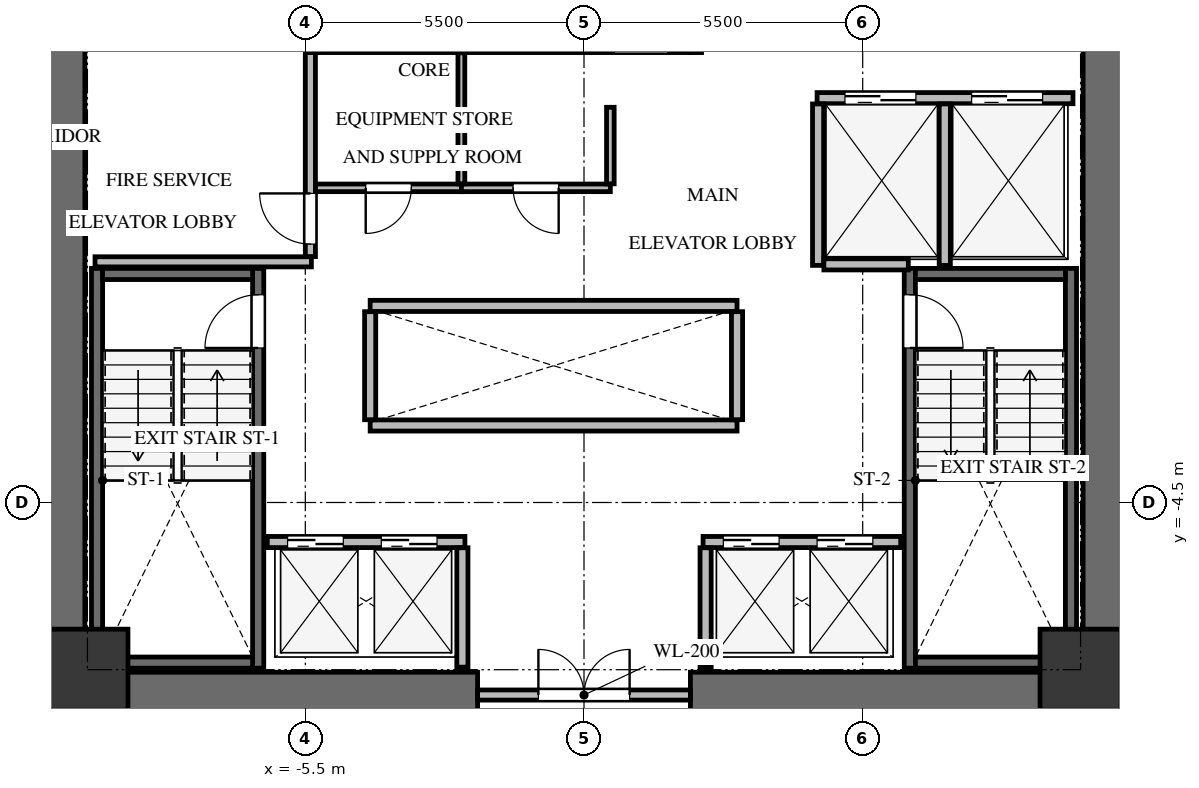
"""IFC4 building model, lengths in metres.
Left out: names, types, materials, properties, quantities, classifications, styles, units other than length and angle.
Written with IfcOpenShell. Run it as: python <this file> out.ifc"""

import sys

from ifc_helpers import new_model, si_unit, direction, frame, frame_2d, origin, origin_2d, place, context, subcontext, project, spatial, rectangle, extrude, source, transform, mapped, element, fill, save


model = new_model("IFC4")
c1 = context("Model", 3, precision=1e-05, world=origin(), true_north=direction((0.0, 1.0)))
c2 = subcontext(c1, "Body", "Model", "MODEL_VIEW")
j1 = project(units=[si_unit("LENGTHUNIT", "METRE"), si_unit("PLANEANGLEUNIT", "RADIAN")], contexts=[c1])
p1 = place(None, origin())
s1 = spatial("IfcSite", under=j1, at=p1, CompositionType="ELEMENT")
p2 = place(p1, origin())
s2 = spatial("IfcBuilding", under=s1, at=p2, CompositionType="ELEMENT")
p3 = place(p2, frame((0.0, 0.0, 48.9)))
s3 = spatial("IfcBuildingStorey", under=s2, at=p3, CompositionType="ELEMENT", Elevation=48.9)
for number, where, z_axis, x_axis in (
    (1, (-10.3, -8.75, 0.0), (0.0, 0.0, 1.0), (0.0, 1.0, 0.0)),
    (2, (10.3, -8.75, 0.0), (0.0, 0.0, 1.0), (0.0, 1.0, 0.0)),
):
    element("IfcWall", number, at=place(p3, frame(where, z_axis=z_axis, x_axis=x_axis)), inside=s3, PredefinedType="SHEAR", context=c2, shape_type="SweptSolid", body=[
        extrude(rectangle(XDim=17.5, YDim=0.9, at=frame_2d((8.75, 0.0))), origin(), (0.0, 0.0, 1.0), 3.3),
    ])
for number, where, z_axis, x_axis in (
    (3, (-9.85, -8.3, 0.0), (0.0, 0.0, 1.0), (1.0, 0.0, 0.0)),
    (4, (2.1, -8.3, 0.0), (0.0, 0.0, 1.0), (1.0, 0.0, 0.0)),
):
    element("IfcWall", number, at=place(p3, frame(where, z_axis=z_axis, x_axis=x_axis)), inside=s3, PredefinedType="SHEAR", context=c2, shape_type="SweptSolid", body=[
        extrude(rectangle(XDim=7.75, YDim=0.9, at=frame_2d((3.875, 0.0))), origin(), (0.0, 0.0, 1.0), 3.3),
    ])
p4 = place(p3, frame((-6.43, -7.77, -0.24), z_axis=(0.0, 0.0, 1.0), x_axis=(0.0, 1.0, 0.0)))
e5 = element("IfcWall", 5, at=p4, inside=s3, PredefinedType="SHEAR", context=c2, shape_type="SweptSolid", body=[
    extrude(rectangle(XDim=7.89, YDim=0.22, at=frame_2d((3.945, 0.0))), origin(), (0.0, 0.0, 1.0), 3.3),
])
p5 = place(p4, frame((6.32, 0.0, 0.0)))
e6 = element("IfcOpeningElement", 6, at=p5, cuts=e5, PredefinedType="OPENING", context=c2, shape_type="SweptSolid", body=[
    extrude(rectangle(XDim=1.05, YDim=2.15, at=frame_2d((0.525, 1.075))), frame((0.0, 0.12, 0.0), z_axis=(0.0, -1.0, 0.0), x_axis=(1.0, 0.0, 0.0)), (0.0, 0.0, 1.0), 0.24),
])
p6 = place(p3, frame((-9.61, 0.12, -0.24), z_axis=(0.0, 0.0, 1.0), x_axis=(0.0, -1.0, 0.0)))
e7 = element("IfcWall", 7, at=p6, inside=s3, PredefinedType="SHEAR", context=c2, shape_type="SweptSolid", body=[
    extrude(rectangle(XDim=7.89, YDim=0.22, at=frame_2d((3.945, 0.0))), origin(), (0.0, 0.0, 1.0), 3.3),
])
for number, where, z_axis, x_axis in (
    (8, (-9.5, -7.66, -0.24), (0.0, 0.0, 1.0), (1.0, 0.0, 0.0)),
    (9, (-6.54, 0.01, -0.24), (0.0, 0.0, 1.0), (-1.0, 0.0, 0.0)),
):
    element("IfcWall", number, at=place(p3, frame(where, z_axis=z_axis, x_axis=x_axis)), inside=s3, PredefinedType="SHEAR", context=c2, shape_type="SweptSolid", body=[
        extrude(rectangle(XDim=2.96, YDim=0.22, at=frame_2d((1.48, 0.0))), origin(), (0.0, 0.0, 1.0), 3.3),
    ])
p7 = place(p3, frame((9.61, -7.77, -0.24), z_axis=(0.0, 0.0, 1.0), x_axis=(0.0, 1.0, 0.0)))
e10 = element("IfcWall", 10, at=p7, inside=s3, PredefinedType="SHEAR", context=c2, shape_type="SweptSolid", body=[
    extrude(rectangle(XDim=7.89, YDim=0.22, at=frame_2d((3.945, 0.0))), origin(), (0.0, 0.0, 1.0), 3.3),
])
p8 = place(p3, frame((6.43, 0.12, -0.24), z_axis=(0.0, 0.0, 1.0), x_axis=(0.0, -1.0, 0.0)))
e11 = element("IfcWall", 11, at=p8, inside=s3, PredefinedType="SHEAR", context=c2, shape_type="SweptSolid", body=[
    extrude(rectangle(XDim=7.89, YDim=0.22, at=frame_2d((3.945, 0.0))), origin(), (0.0, 0.0, 1.0), 3.3),
])
p9 = place(p8, frame((0.52, 0.0, 0.0)))
e12 = element("IfcOpeningElement", 12, at=p9, cuts=e11, PredefinedType="OPENING", context=c2, shape_type="SweptSolid", body=[
    extrude(rectangle(XDim=1.05, YDim=2.15, at=frame_2d((0.525, 1.075))), frame((0.0, 0.12, 0.0), z_axis=(0.0, -1.0, 0.0), x_axis=(1.0, 0.0, 0.0)), (0.0, 0.0, 1.0), 0.24),
])
for number, where, z_axis, x_axis in (
    (13, (6.54, -7.66, -0.24), (0.0, 0.0, 1.0), (1.0, 0.0, 0.0)),
    (14, (9.5, 0.01, -0.24), (0.0, 0.0, 1.0), (-1.0, 0.0, 0.0)),
):
    element("IfcWall", number, at=place(p3, frame(where, z_axis=z_axis, x_axis=x_axis)), inside=s3, PredefinedType="SHEAR", context=c2, shape_type="SweptSolid", body=[
        extrude(rectangle(XDim=2.96, YDim=0.22, at=frame_2d((1.48, 0.0))), origin(), (0.0, 0.0, 1.0), 3.3),
    ])
for number, where, z_axis, x_axis in (
    (15, (2.21, 4.38, -0.24), (0.0, 0.0, 1.0), (0.0, 1.0, 0.0)),
    (16, (-5.36, 7.78, -0.24), (0.0, 0.0, 1.0), (0.0, -1.0, 0.0)),
):
    element("IfcWall", number, at=place(p3, frame(where, z_axis=z_axis, x_axis=x_axis)), inside=s3, PredefinedType="SHEAR", context=c2, shape_type="SweptSolid", body=[
        extrude(rectangle(XDim=3.4, YDim=0.22, at=frame_2d((1.7, 0.0))), origin(), (0.0, 0.0, 1.0), 3.3),
    ])
p10 = place(p3, frame((-5.25, 4.49, -0.24), z_axis=(0.0, 0.0, 1.0), x_axis=(1.0, 0.0, 0.0)))
e17 = element("IfcWall", 17, at=p10, inside=s3, PredefinedType="SHEAR", context=c2, shape_type="SweptSolid", body=[
    extrude(rectangle(XDim=7.35, YDim=0.22, at=frame_2d((3.675, 0.0))), origin(), (0.0, 0.0, 1.0), 3.3),
])
p11 = place(p10, frame((5.85, 0.0, 0.0)))
e18 = element("IfcOpeningElement", 18, at=p11, cuts=e17, PredefinedType="OPENING", context=c2, shape_type="SweptSolid", body=[
    extrude(rectangle(XDim=1.05, YDim=2.15, at=frame_2d((0.525, 1.075))), frame((0.0, 0.12, 0.0), z_axis=(0.0, -1.0, 0.0), x_axis=(1.0, 0.0, 0.0)), (0.0, 0.0, 1.0), 0.24),
])
m1 = source(origin(), c2, "Body", "SweptSolid", [
    extrude(rectangle(XDim=1.6, YDim=1.6, at=origin_2d()), origin(), (0.0, 0.0, 1.0), 3.3),
])
for number, where, z_axis, x_axis in (
    (19, (-9.8, -7.8, -0.24), (0.0, 0.0, 1.0), (1.0, 0.0, 0.0)),
    (20, (9.8, -7.8, -0.24), (0.0, 0.0, 1.0), (1.0, 0.0, 0.0)),
):
    element("IfcColumn", number, at=place(p3, frame(where, z_axis=z_axis, x_axis=x_axis)), inside=s3, PredefinedType="COLUMN", context=c2, shape_type="MappedRepresentation", body=[
        mapped(m1, transform((0.0, 0.0, 0.0), x_axis=(1.0, 0.0, 0.0), y_axis=(0.0, 1.0, 0.0), z_axis=(0.0, 0.0, 1.0), scale=1.0)),
    ])
p12 = place(p3, frame((-2.1, -8.3, 0.0), z_axis=(0.0, 0.0, 1.0), x_axis=(1.0, 0.0, 0.0)))
e21 = element("IfcWall", 21, at=p12, inside=s3, PredefinedType="SOLIDWALL", context=c2, shape_type="SweptSolid", body=[
    extrude(rectangle(XDim=4.2, YDim=0.2, at=frame_2d((2.1, 0.0))), origin(), (0.0, 0.0, 1.0), 3.045),
])
p13 = place(p12, frame((1.2, 0.0, 0.0)))
e22 = element("IfcOpeningElement", 22, at=p13, cuts=e21, PredefinedType="OPENING", context=c2, shape_type="SweptSolid", body=[
    extrude(rectangle(XDim=1.8, YDim=2.15, at=frame_2d((0.9, 1.075))), frame((0.0, 0.11, 0.0), z_axis=(0.0, -1.0, 0.0), x_axis=(1.0, 0.0, 0.0)), (0.0, 0.0, 1.0), 0.22),
])
p14 = place(p3, frame((-9.65, 0.25, 0.0), z_axis=(0.0, 0.0, 1.0), x_axis=(1.0, 0.0, 0.0)))
e23 = element("IfcWall", 23, at=p14, inside=s3, PredefinedType="SOLIDWALL", context=c2, shape_type="SweptSolid", body=[
    extrude(rectangle(XDim=4.27, YDim=0.2, at=frame_2d((2.135, 0.0))), origin(), (0.0, 0.0, 1.0), 3.045),
])
p15 = place(p3, frame((-5.4, 0.354, 0.0), z_axis=(0.0, 0.0, 1.0), x_axis=(0.0, 1.0, 0.0)))
e24 = element("IfcWall", 24, at=p15, inside=s3, PredefinedType="SOLIDWALL", context=c2, shape_type="SweptSolid", body=[
    extrude(rectangle(XDim=4.026, YDim=0.2, at=frame_2d((2.013, 0.0))), origin(), (0.0, 0.0, 1.0), 3.045),
])
p16 = place(p15, frame((0.246, 0.0, 0.0)))
e25 = element("IfcOpeningElement", 25, at=p16, cuts=e24, PredefinedType="OPENING", context=c2, shape_type="SweptSolid", body=[
    extrude(rectangle(XDim=1.0, YDim=2.15, at=frame_2d((0.5, 1.075))), frame((0.0, 0.11, 0.0), z_axis=(0.0, -1.0, 0.0), x_axis=(1.0, 0.0, 0.0)), (0.0, 0.0, 1.0), 0.22),
])
p17 = place(p3, frame((4.6, 3.48, 0.0), z_axis=(0.0, 0.0, 1.0), x_axis=(1.0, 0.0, 0.0)))
e26 = element("IfcWall", 26, at=p17, inside=s3, PredefinedType="SOLIDWALL", context=c2, shape_type="SweptSolid", body=[
    extrude(rectangle(XDim=5.05, YDim=0.22, at=frame_2d((2.525, 0.0))), origin(), (0.0, 0.0, 1.0), 3.045),
])
p18 = place(p17, frame((0.55, 0.0, 0.0)))
e27 = element("IfcOpeningElement", 27, at=p18, cuts=e26, PredefinedType="OPENING", context=c2, shape_type="SweptSolid", body=[
    extrude(rectangle(XDim=1.4, YDim=2.15, at=frame_2d((0.7, 1.075))), frame((0.0, 0.12, 0.0), z_axis=(0.0, -1.0, 0.0), x_axis=(1.0, 0.0, 0.0)), (0.0, 0.0, 1.0), 0.24),
])
p19 = place(p17, frame((3.05, 0.0, 0.0)))
e28 = element("IfcOpeningElement", 28, at=p19, cuts=e26, PredefinedType="OPENING", context=c2, shape_type="SweptSolid", body=[
    extrude(rectangle(XDim=1.4, YDim=2.15, at=frame_2d((0.7, 1.075))), frame((0.0, 0.12, 0.0), z_axis=(0.0, -1.0, 0.0), x_axis=(1.0, 0.0, 0.0)), (0.0, 0.0, 1.0), 0.24),
])
for number, where, z_axis, x_axis in (
    (29, (4.62, 0.18, 0.0), (0.0, 0.0, 1.0), (0.0, 1.0, 0.0)),
    (30, (7.12, 0.18, 0.0), (0.0, 0.0, 1.0), (0.0, 1.0, 0.0)),
):
    element("IfcWall", number, at=place(p3, frame(where, z_axis=z_axis, x_axis=x_axis)), inside=s3, PredefinedType="SOLIDWALL", context=c2, shape_type="SweptSolid", body=[
        extrude(rectangle(XDim=3.186, YDim=0.22, at=frame_2d((1.593, 0.0))), origin(), (0.0, 0.0, 1.0), 3.045),
    ])
p20 = place(p3, frame((4.734, 0.2, 0.0), z_axis=(0.0, 0.0, 1.0), x_axis=(1.0, 0.0, 0.0)))
e31 = element("IfcWall", 31, at=p20, inside=s3, PredefinedType="SOLIDWALL", context=c2, shape_type="SweptSolid", body=[
    extrude(rectangle(XDim=1.666, YDim=0.22, at=frame_2d((0.833, 0.0))), origin(), (0.0, 0.0, 1.0), 3.045),
])
p21 = place(p3, frame((-6.25, -5.28, 0.0), z_axis=(0.0, 0.0, 1.0), x_axis=(1.0, 0.0, 0.0)))
e32 = element("IfcWall", 32, at=p21, inside=s3, PredefinedType="SOLIDWALL", context=c2, shape_type="SweptSolid", body=[
    extrude(rectangle(XDim=3.9, YDim=0.22, at=frame_2d((1.95, 0.0))), origin(), (0.0, 0.0, 1.0), 3.045),
])
p22 = place(p21, frame((0.4, 0.0, 0.0)))
e33 = element("IfcOpeningElement", 33, at=p22, cuts=e32, PredefinedType="OPENING", context=c2, shape_type="SweptSolid", body=[
    extrude(rectangle(XDim=1.1, YDim=2.15, at=frame_2d((0.55, 1.075))), frame((0.0, 0.12, 0.0), z_axis=(0.0, -1.0, 0.0), x_axis=(1.0, 0.0, 0.0)), (0.0, 0.0, 1.0), 0.24),
])
p23 = place(p21, frame((2.25, 0.0, 0.0)))
e34 = element("IfcOpeningElement", 34, at=p23, cuts=e32, PredefinedType="OPENING", context=c2, shape_type="SweptSolid", body=[
    extrude(rectangle(XDim=1.1, YDim=2.15, at=frame_2d((0.55, 1.075))), frame((0.0, 0.12, 0.0), z_axis=(0.0, -1.0, 0.0), x_axis=(1.0, 0.0, 0.0)), (0.0, 0.0, 1.0), 0.24),
])
p24 = place(p3, frame((2.35, -5.28, 0.0), z_axis=(0.0, 0.0, 1.0), x_axis=(1.0, 0.0, 0.0)))
e35 = element("IfcWall", 35, at=p24, inside=s3, PredefinedType="SOLIDWALL", context=c2, shape_type="SweptSolid", body=[
    extrude(rectangle(XDim=3.9, YDim=0.22, at=frame_2d((1.95, 0.0))), origin(), (0.0, 0.0, 1.0), 3.045),
])
p25 = place(p24, frame((0.4, 0.0, 0.0)))
e36 = element("IfcOpeningElement", 36, at=p25, cuts=e35, PredefinedType="OPENING", context=c2, shape_type="SweptSolid", body=[
    extrude(rectangle(XDim=1.1, YDim=2.15, at=frame_2d((0.55, 1.075))), frame((0.0, 0.12, 0.0), z_axis=(0.0, -1.0, 0.0), x_axis=(1.0, 0.0, 0.0)), (0.0, 0.0, 1.0), 0.24),
])
p26 = place(p24, frame((2.25, 0.0, 0.0)))
e37 = element("IfcOpeningElement", 37, at=p26, cuts=e35, PredefinedType="OPENING", context=c2, shape_type="SweptSolid", body=[
    extrude(rectangle(XDim=1.1, YDim=2.15, at=frame_2d((0.55, 1.075))), frame((0.0, 0.12, 0.0), z_axis=(0.0, -1.0, 0.0), x_axis=(1.0, 0.0, 0.0)), (0.0, 0.0, 1.0), 0.24),
])
for number, where, z_axis, x_axis in (
    (38, (-2.4, -7.75, 0.0), (0.0, 0.0, 1.0), (0.0, 1.0, 0.0)),
    (39, (2.4, -7.75, 0.0), (0.0, 0.0, 1.0), (0.0, 1.0, 0.0)),
):
    element("IfcWall", number, at=place(p3, frame(where, z_axis=z_axis, x_axis=x_axis)), inside=s3, PredefinedType="SOLIDWALL", context=c2, shape_type="SweptSolid", body=[
        extrude(rectangle(XDim=2.356, YDim=0.22, at=frame_2d((1.178, 0.0))), origin(), (0.0, 0.0, 1.0), 3.045),
    ])
for number, where, z_axis, x_axis in (
    (40, (-4.22, -2.98, 0.0), (0.0, 0.0, 1.0), (1.0, 0.0, 0.0)),
    (41, (-4.22, -0.62, 0.0), (0.0, 0.0, 1.0), (1.0, 0.0, 0.0)),
):
    element("IfcWall", number, at=place(p3, frame(where, z_axis=z_axis, x_axis=x_axis)), inside=s3, PredefinedType="SOLIDWALL", context=c2, shape_type="SweptSolid", body=[
        extrude(rectangle(XDim=7.24, YDim=0.22, at=frame_2d((3.62, 0.0))), origin(), (0.0, 0.0, 1.0), 3.045),
    ])
for number, where, z_axis, x_axis in (
    (42, (-4.22, -2.866, 0.0), (0.0, 0.0, 1.0), (0.0, 1.0, 0.0)),
    (43, (3.02, -2.866, 0.0), (0.0, 0.0, 1.0), (0.0, 1.0, 0.0)),
):
    element("IfcWall", number, at=place(p3, frame(where, z_axis=z_axis, x_axis=x_axis)), inside=s3, PredefinedType="SOLIDWALL", context=c2, shape_type="SweptSolid", body=[
        extrude(rectangle(XDim=2.132, YDim=0.22, at=frame_2d((1.066, 0.0))), origin(), (0.0, 0.0, 1.0), 3.045),
    ])
p27 = place(p3, frame((-2.42, 1.71, 0.0), z_axis=(0.0, 0.0, 1.0), x_axis=(-1.0, 0.0, 0.0)))
e44 = element("IfcWall", 44, at=p27, inside=s3, PredefinedType="PARTITIONING", context=c2, shape_type="SweptSolid", body=[
    extrude(rectangle(XDim=2.876, YDim=0.15, at=frame_2d((1.438, 0.0))), origin(), (0.0, 0.0, 1.0), 3.045),
])
p28 = place(p27, frame((0.988, 0.0, 0.0)))
e45 = element("IfcOpeningElement", 45, at=p28, cuts=e44, PredefinedType="OPENING", context=c2, shape_type="SweptSolid", body=[
    extrude(rectangle(XDim=0.9, YDim=2.05, at=frame_2d((0.45, 1.025))), frame((0.0, 0.085, 0.0), z_axis=(0.0, -1.0, 0.0), x_axis=(1.0, 0.0, 0.0)), (0.0, 0.0, 1.0), 0.17),
])
p29 = place(p3, frame((0.52, 1.71, 0.0), z_axis=(0.0, 0.0, 1.0), x_axis=(-1.0, 0.0, 0.0)))
e46 = element("IfcWall", 46, at=p29, inside=s3, PredefinedType="PARTITIONING", context=c2, shape_type="SweptSolid", body=[
    extrude(rectangle(XDim=2.94, YDim=0.15, at=frame_2d((1.47, 0.0))), origin(), (0.0, 0.0, 1.0), 3.045),
])
p30 = place(p29, frame((1.02, 0.0, 0.0)))
e47 = element("IfcOpeningElement", 47, at=p30, cuts=e46, PredefinedType="OPENING", context=c2, shape_type="SweptSolid", body=[
    extrude(rectangle(XDim=0.9, YDim=2.05, at=frame_2d((0.45, 1.025))), frame((0.0, 0.085, 0.0), z_axis=(0.0, -1.0, 0.0), x_axis=(1.0, 0.0, 0.0)), (0.0, 0.0, 1.0), 0.17),
])
p31 = place(p3, frame((0.52, 3.3, 0.0), z_axis=(0.0, 0.0, 1.0), x_axis=(0.0, -1.0, 0.0)))
e48 = element("IfcWall", 48, at=p31, inside=s3, PredefinedType="PARTITIONING", context=c2, shape_type="SweptSolid", body=[
    extrude(rectangle(XDim=1.511, YDim=0.15, at=frame_2d((0.755, 0.0))), origin(), (0.0, 0.0, 1.0), 3.045),
])
p32 = place(p3, frame((-2.42, 4.375, 0.0), z_axis=(0.0, 0.0, 1.0), x_axis=(0.0, -1.0, 0.0)))
e49 = element("IfcWall", 49, at=p32, inside=s3, PredefinedType="PARTITIONING", context=c2, shape_type="SweptSolid", body=[
    extrude(rectangle(XDim=2.586, YDim=0.135, at=frame_2d((1.293, 0.0))), origin(), (0.0, 0.0, 1.0), 3.045),
])
m2 = source(origin(), c2, "Body", "SweptSolid", [
    extrude(rectangle(XDim=1.05, YDim=2.15, at=frame_2d((0.525, 1.075))), frame((0.0, 0.025, 0.0), z_axis=(0.0, -1.0, 0.0), x_axis=(1.0, 0.0, 0.0)), (0.0, 0.0, 1.0), 0.05),
])
p33 = place(p5, origin())
e50 = element("IfcDoor", 50, at=p33, inside=s3, OperationType="SINGLE_SWING_LEFT", PredefinedType="DOOR", context=c2, shape_type="MappedRepresentation", body=[
    mapped(m2, transform((0.0, 0.0, 0.0), x_axis=(1.0, 0.0, 0.0), y_axis=(0.0, 1.0, 0.0), z_axis=(0.0, 0.0, 1.0), scale=1.0)),
])
fill(e6, e50)
m3 = source(origin(), c2, "Body", "SweptSolid", [
    extrude(rectangle(XDim=1.05, YDim=2.15, at=frame_2d((0.525, 1.075))), frame((0.0, 0.025, 0.0), z_axis=(0.0, -1.0, 0.0), x_axis=(1.0, 0.0, 0.0)), (0.0, 0.0, 1.0), 0.05),
])
p34 = place(p9, origin())
e51 = element("IfcDoor", 51, at=p34, inside=s3, OperationType="SINGLE_SWING_RIGHT", PredefinedType="DOOR", context=c2, shape_type="MappedRepresentation", body=[
    mapped(m3, transform((0.0, 0.0, 0.0), x_axis=(1.0, 0.0, 0.0), y_axis=(0.0, 1.0, 0.0), z_axis=(0.0, 0.0, 1.0), scale=1.0)),
])
fill(e12, e51)
m4 = source(origin(), c2, "Body", "SweptSolid", [
    extrude(rectangle(XDim=1.8, YDim=2.15, at=frame_2d((0.9, 1.075))), frame((0.0, 0.025, 0.0), z_axis=(0.0, -1.0, 0.0), x_axis=(1.0, 0.0, 0.0)), (0.0, 0.0, 1.0), 0.05),
])
p35 = place(p13, origin())
e52 = element("IfcDoor", 52, at=p35, inside=s3, OperationType="DOUBLE_DOOR_SINGLE_SWING", PredefinedType="DOOR", context=c2, shape_type="MappedRepresentation", body=[
    mapped(m4, transform((0.0, 0.0, 0.0), x_axis=(1.0, 0.0, 0.0), y_axis=(0.0, 1.0, 0.0), z_axis=(0.0, 0.0, 1.0), scale=1.0)),
])
fill(e22, e52)
m5 = source(origin(), c2, "Body", "SweptSolid", [
    extrude(rectangle(XDim=1.0, YDim=2.15, at=frame_2d((0.5, 1.075))), frame((0.0, 0.025, 0.0), z_axis=(0.0, -1.0, 0.0), x_axis=(1.0, 0.0, 0.0)), (0.0, 0.0, 1.0), 0.05),
])
p36 = place(p16, origin())
e53 = element("IfcDoor", 53, at=p36, inside=s3, OperationType="SINGLE_SWING_RIGHT", PredefinedType="DOOR", context=c2, shape_type="MappedRepresentation", body=[
    mapped(m5, transform((0.0, 0.0, 0.0), x_axis=(1.0, 0.0, 0.0), y_axis=(0.0, 1.0, 0.0), z_axis=(0.0, 0.0, 1.0), scale=1.0)),
])
fill(e25, e53)
m6 = source(origin(), c2, "Body", "SweptSolid", [
    extrude(rectangle(XDim=1.4, YDim=2.15, at=frame_2d((0.7, 1.075))), frame((0.0, 0.025, 0.0), z_axis=(0.0, -1.0, 0.0), x_axis=(1.0, 0.0, 0.0)), (0.0, 0.0, 1.0), 0.05),
])
p37 = place(p18, origin())
e54 = element("IfcDoor", 54, at=p37, inside=s3, OperationType="DOUBLE_DOOR_SLIDING", PredefinedType="DOOR", context=c2, shape_type="MappedRepresentation", body=[
    mapped(m6, transform((0.0, 0.0, 0.0), x_axis=(1.0, 0.0, 0.0), y_axis=(0.0, 1.0, 0.0), z_axis=(0.0, 0.0, 1.0), scale=1.0)),
])
fill(e27, e54)
p38 = place(p19, origin())
e55 = element("IfcDoor", 55, at=p38, inside=s3, OperationType="DOUBLE_DOOR_SLIDING", PredefinedType="DOOR", context=c2, shape_type="MappedRepresentation", body=[
    mapped(m6, transform((0.0, 0.0, 0.0), x_axis=(1.0, 0.0, 0.0), y_axis=(0.0, 1.0, 0.0), z_axis=(0.0, 0.0, 1.0), scale=1.0)),
])
fill(e28, e55)
m7 = source(origin(), c2, "Body", "SweptSolid", [
    extrude(rectangle(XDim=1.1, YDim=2.15, at=frame_2d((0.55, 1.075))), frame((0.0, 0.025, 0.0), z_axis=(0.0, -1.0, 0.0), x_axis=(1.0, 0.0, 0.0)), (0.0, 0.0, 1.0), 0.05),
])
p39 = place(p22, origin())
e56 = element("IfcDoor", 56, at=p39, inside=s3, OperationType="DOUBLE_DOOR_SLIDING", PredefinedType="DOOR", context=c2, shape_type="MappedRepresentation", body=[
    mapped(m7, transform((0.0, 0.0, 0.0), x_axis=(1.0, 0.0, 0.0), y_axis=(0.0, 1.0, 0.0), z_axis=(0.0, 0.0, 1.0), scale=1.0)),
])
fill(e33, e56)
p40 = place(p23, origin())
e57 = element("IfcDoor", 57, at=p40, inside=s3, OperationType="DOUBLE_DOOR_SLIDING", PredefinedType="DOOR", context=c2, shape_type="MappedRepresentation", body=[
    mapped(m7, transform((0.0, 0.0, 0.0), x_axis=(1.0, 0.0, 0.0), y_axis=(0.0, 1.0, 0.0), z_axis=(0.0, 0.0, 1.0), scale=1.0)),
])
fill(e34, e57)
p41 = place(p25, origin())
e58 = element("IfcDoor", 58, at=p41, inside=s3, OperationType="DOUBLE_DOOR_SLIDING", PredefinedType="DOOR", context=c2, shape_type="MappedRepresentation", body=[
    mapped(m7, transform((0.0, 0.0, 0.0), x_axis=(1.0, 0.0, 0.0), y_axis=(0.0, 1.0, 0.0), z_axis=(0.0, 0.0, 1.0), scale=1.0)),
])
fill(e36, e58)
p42 = place(p26, origin())
e59 = element("IfcDoor", 59, at=p42, inside=s3, OperationType="DOUBLE_DOOR_SLIDING", PredefinedType="DOOR", context=c2, shape_type="MappedRepresentation", body=[
    mapped(m7, transform((0.0, 0.0, 0.0), x_axis=(1.0, 0.0, 0.0), y_axis=(0.0, 1.0, 0.0), z_axis=(0.0, 0.0, 1.0), scale=1.0)),
])
fill(e37, e59)
m8 = source(origin(), c2, "Body", "SweptSolid", [
    extrude(rectangle(XDim=0.9, YDim=2.05, at=frame_2d((0.45, 1.025))), frame((0.0, 0.025, 0.0), z_axis=(0.0, -1.0, 0.0), x_axis=(1.0, 0.0, 0.0)), (0.0, 0.0, 1.0), 0.05),
])
p43 = place(p28, origin())
e60 = element("IfcDoor", 60, at=p43, inside=s3, OperationType="SINGLE_SWING_RIGHT", PredefinedType="DOOR", context=c2, shape_type="MappedRepresentation", body=[
    mapped(m8, transform((0.0, 0.0, 0.0), x_axis=(1.0, 0.0, 0.0), y_axis=(0.0, 1.0, 0.0), z_axis=(0.0, 0.0, 1.0), scale=1.0)),
])
fill(e45, e60)
m9 = source(origin(), c2, "Body", "SweptSolid", [
    extrude(rectangle(XDim=0.9, YDim=2.05, at=frame_2d((0.45, 1.025))), frame((0.0, 0.025, 0.0), z_axis=(0.0, -1.0, 0.0), x_axis=(1.0, 0.0, 0.0)), (0.0, 0.0, 1.0), 0.05),
])
p44 = place(p30, origin())
e61 = element("IfcDoor", 61, at=p44, inside=s3, OperationType="SINGLE_SWING_LEFT", PredefinedType="DOOR", context=c2, shape_type="MappedRepresentation", body=[
    mapped(m9, transform((0.0, 0.0, 0.0), x_axis=(1.0, 0.0, 0.0), y_axis=(0.0, 1.0, 0.0), z_axis=(0.0, 0.0, 1.0), scale=1.0)),
])
fill(e47, e61)
save(model, sys.argv[1])
